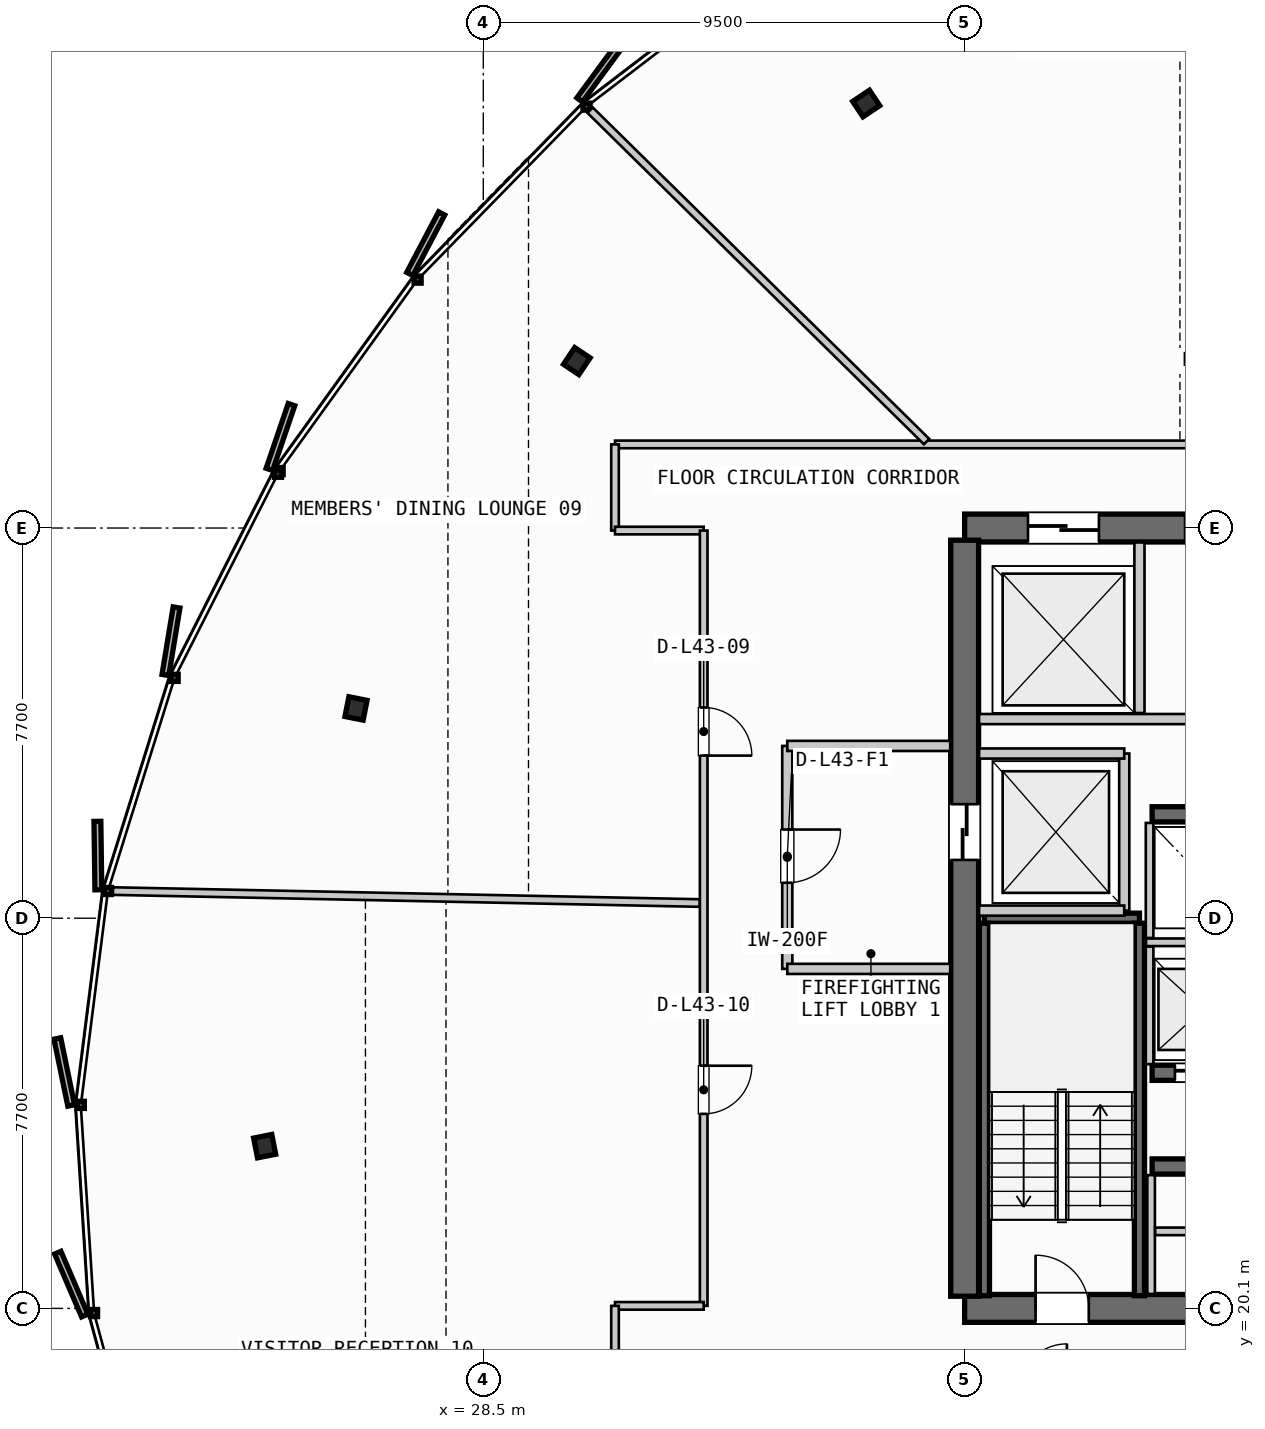
"""IFC4 building model, lengths in metres.
Left out: names, types, materials, properties, quantities, classifications, styles, units other than length and angle.
Written with IfcOpenShell. Run it as: python <this file> out.ifc"""

import sys

from ifc_helpers import new_model, si_unit, direction, frame, frame_2d, origin, origin_2d, place, context, subcontext, project, spatial, rectangle, i_section, extrude, source, transform, mapped, element, fill, save


model = new_model("IFC4")
c1 = context("Model", 3, precision=1e-05, world=origin(), true_north=direction((0.0, 1.0)))
c2 = subcontext(c1, "Body", "Model", "MODEL_VIEW")
j1 = project(units=[si_unit("LENGTHUNIT", "METRE"), si_unit("PLANEANGLEUNIT", "RADIAN")], contexts=[c1])
p1 = place(None, origin())
s1 = spatial("IfcSite", under=j1, at=p1, CompositionType="ELEMENT")
p2 = place(p1, origin())
s2 = spatial("IfcBuilding", under=s1, at=p2, CompositionType="ELEMENT")
p3 = place(p2, frame((0.0, 0.0, 167.85)))
s3 = spatial("IfcBuildingStorey", under=s2, at=p3, CompositionType="ELEMENT", Elevation=167.85)
p4 = place(p3, frame((38.0, 20.1, 0.0), z_axis=(0.0, 0.0, 1.0), x_axis=(1.0, 0.0, 0.0)))
e1 = element("IfcWall", 1, at=p4, inside=s3, PredefinedType="SHEAR", context=c2, shape_type="SweptSolid", body=[
    extrude(rectangle(XDim=17.6, YDim=0.55, at=frame_2d((8.8, 0.0))), origin(), (0.0, 0.0, 1.0), 3.24),
])
p5 = place(p4, frame((1.4, 0.0, 0.0)))
e2 = element("IfcOpeningElement", 2, at=p5, cuts=e1, PredefinedType="OPENING", context=c2, shape_type="SweptSolid", body=[
    extrude(rectangle(XDim=1.05, YDim=2.15, at=frame_2d((0.525, 1.075))), frame((0.0, 0.285, 0.0), z_axis=(0.0, -1.0, 0.0), x_axis=(1.0, 0.0, 0.0)), (0.0, 0.0, 1.0), 0.57),
])
p6 = place(p4, frame((15.15, 0.0, 0.0)))
e3 = element("IfcOpeningElement", 3, at=p6, cuts=e1, PredefinedType="OPENING", context=c2, shape_type="SweptSolid", body=[
    extrude(rectangle(XDim=1.05, YDim=2.15, at=frame_2d((0.525, 1.075))), frame((0.0, 0.285, 0.0), z_axis=(0.0, -1.0, 0.0), x_axis=(1.0, 0.0, 0.0)), (0.0, 0.0, 1.0), 0.57),
])
p7 = place(p4, frame((5.25, 0.0, 0.0)))
e4 = element("IfcOpeningElement", 4, at=p7, cuts=e1, PredefinedType="OPENING", context=c2, shape_type="SweptSolid", body=[
    extrude(rectangle(XDim=0.95, YDim=2.15, at=frame_2d((0.475, 1.075))), frame((0.0, 0.285, 0.0), z_axis=(0.0, -1.0, 0.0), x_axis=(1.0, 0.0, 0.0)), (0.0, 0.0, 1.0), 0.57),
])
p8 = place(p4, frame((11.4, 0.0, 0.0)))
e5 = element("IfcOpeningElement", 5, at=p8, cuts=e1, PredefinedType="OPENING", context=c2, shape_type="SweptSolid", body=[
    extrude(rectangle(XDim=0.95, YDim=2.15, at=frame_2d((0.475, 1.075))), frame((0.0, 0.285, 0.0), z_axis=(0.0, -1.0, 0.0), x_axis=(1.0, 0.0, 0.0)), (0.0, 0.0, 1.0), 0.57),
])
p9 = place(p3, frame((55.6, 35.5, 0.0), z_axis=(0.0, 0.0, 1.0), x_axis=(-1.0, 0.0, 0.0)))
e6 = element("IfcWall", 6, at=p9, inside=s3, PredefinedType="SHEAR", context=c2, shape_type="SweptSolid", body=[
    extrude(rectangle(XDim=17.6, YDim=0.55, at=frame_2d((8.8, 0.0))), origin(), (0.0, 0.0, 1.0), 3.24),
])
p10 = place(p9, frame((8.05, 0.0, 0.0)))
e7 = element("IfcOpeningElement", 7, at=p10, cuts=e6, PredefinedType="OPENING", context=c2, shape_type="SweptSolid", body=[
    extrude(rectangle(XDim=1.5, YDim=2.2, at=frame_2d((0.75, 1.1))), frame((0.0, 0.285, 0.0), z_axis=(0.0, -1.0, 0.0), x_axis=(1.0, 0.0, 0.0)), (0.0, 0.0, 1.0), 0.57),
])
p11 = place(p9, frame((14.95, 0.0, 0.0)))
e8 = element("IfcOpeningElement", 8, at=p11, cuts=e6, PredefinedType="OPENING", context=c2, shape_type="SweptSolid", body=[
    extrude(rectangle(XDim=1.4, YDim=2.3, at=frame_2d((0.7, 1.15))), frame((0.0, 0.285, 0.0), z_axis=(0.0, -1.0, 0.0), x_axis=(1.0, 0.0, 0.0)), (0.0, 0.0, 1.0), 0.57),
])
p12 = place(p9, frame((12.3, 0.0, 0.0)))
e9 = element("IfcOpeningElement", 9, at=p12, cuts=e6, PredefinedType="OPENING", context=c2, shape_type="SweptSolid", body=[
    extrude(rectangle(XDim=0.95, YDim=2.15, at=frame_2d((0.475, 1.075))), frame((0.0, 0.285, 0.0), z_axis=(0.0, -1.0, 0.0), x_axis=(1.0, 0.0, 0.0)), (0.0, 0.0, 1.0), 0.57),
])
p13 = place(p9, frame((10.2, 0.0, 0.0)))
e10 = element("IfcOpeningElement", 10, at=p13, cuts=e6, PredefinedType="OPENING", context=c2, shape_type="SweptSolid", body=[
    extrude(rectangle(XDim=0.9, YDim=2.15, at=frame_2d((0.45, 1.075))), frame((0.0, 0.285, 0.0), z_axis=(0.0, -1.0, 0.0), x_axis=(1.0, 0.0, 0.0)), (0.0, 0.0, 1.0), 0.57),
])
p14 = place(p3, frame((38.0, 35.26, 0.0), z_axis=(0.0, 0.0, 1.0), x_axis=(0.0, -1.0, 0.0)))
e11 = element("IfcWall", 11, at=p14, inside=s3, PredefinedType="SHEAR", context=c2, shape_type="SweptSolid", body=[
    extrude(rectangle(XDim=14.92, YDim=0.55, at=frame_2d((7.46, 0.0))), origin(), (0.0, 0.0, 1.0), 3.24),
])
p15 = place(p14, frame((5.21, 0.0, 0.0)))
e12 = element("IfcOpeningElement", 12, at=p15, cuts=e11, PredefinedType="OPENING", context=c2, shape_type="SweptSolid", body=[
    extrude(rectangle(XDim=1.1, YDim=2.2, at=frame_2d((0.55, 1.1))), frame((0.0, 0.285, 0.0), z_axis=(0.0, -1.0, 0.0), x_axis=(1.0, 0.0, 0.0)), (0.0, 0.0, 1.0), 0.57),
])
p16 = place(p3, frame((41.7, 22.9, 0.0), z_axis=(0.0, 0.0, 1.0), x_axis=(1.0, 0.0, 0.0)))
e13 = element("IfcWall", 13, at=p16, inside=s3, PredefinedType="SHEAR", context=c2, shape_type="SweptSolid", body=[
    extrude(rectangle(XDim=4.25, YDim=0.3, at=frame_2d((2.125, 0.0))), origin(), (0.0, 0.0, 1.0), 3.24),
])
p17 = place(p3, frame((41.7, 24.75, 0.0), z_axis=(0.0, 0.0, 1.0), x_axis=(1.0, 0.0, 0.0)))
e14 = element("IfcWall", 14, at=p17, inside=s3, PredefinedType="SHEAR", context=c2, shape_type="SweptSolid", body=[
    extrude(rectangle(XDim=4.25, YDim=0.3, at=frame_2d((2.125, 0.0))), origin(), (0.0, 0.0, 1.0), 3.24),
])
p18 = place(p17, frame((0.45, 0.0, 0.0)))
e15 = element("IfcOpeningElement", 15, at=p18, cuts=e14, PredefinedType="OPENING", context=c2, shape_type="SweptSolid", body=[
    extrude(rectangle(XDim=1.1, YDim=2.2, at=frame_2d((0.55, 1.1))), frame((0.0, 0.16, 0.0), z_axis=(0.0, -1.0, 0.0), x_axis=(1.0, 0.0, 0.0)), (0.0, 0.0, 1.0), 0.32),
])
p19 = place(p17, frame((2.5, 0.0, 0.0)))
e16 = element("IfcOpeningElement", 16, at=p19, cuts=e14, PredefinedType="OPENING", context=c2, shape_type="SweptSolid", body=[
    extrude(rectangle(XDim=1.1, YDim=2.2, at=frame_2d((0.55, 1.1))), frame((0.0, 0.16, 0.0), z_axis=(0.0, -1.0, 0.0), x_axis=(1.0, 0.0, 0.0)), (0.0, 0.0, 1.0), 0.32),
])
p20 = place(p3, frame((41.7, 29.85, 0.0), z_axis=(0.0, 0.0, 1.0), x_axis=(1.0, 0.0, 0.0)))
e17 = element("IfcWall", 17, at=p20, inside=s3, PredefinedType="SHEAR", context=c2, shape_type="SweptSolid", body=[
    extrude(rectangle(XDim=4.25, YDim=0.3, at=frame_2d((2.125, 0.0))), origin(), (0.0, 0.0, 1.0), 3.24),
])
m1 = source(origin(), c2, "Body", "SweptSolid", [
    extrude(i_section(OverallWidth=0.397, OverallDepth=0.365, WebThickness=0.028, FlangeThickness=0.044, FilletRadius=0.015, at=origin_2d()), origin(), (0.0, 0.0, 1.0), 3.24),
])
for number, where, z_axis, x_axis in (
    (18, (36.058, 43.877, 0.0), (0.0, 0.0, 1.0), (-0.556, 0.831, 0.0)),
    (19, (30.346, 38.794, 0.0), (0.0, 0.0, 1.0), (-0.831, 0.556, 0.0)),
    (20, (25.989, 31.94, 0.0), (0.0, 0.0, 1.0), (-0.981, 0.195, 0.0)),
    (21, (24.185, 23.302, 0.0), (0.0, 0.0, 1.0), (-0.981, -0.195, 0.0)),
):
    element("IfcColumn", number, at=place(p3, frame(where, z_axis=z_axis, x_axis=x_axis)), inside=s3, PredefinedType="COLUMN", context=c2, shape_type="MappedRepresentation", body=[
        mapped(m1, transform((0.0, 0.0, 0.0), scale=1.0)),
    ])
p21 = place(p3, frame((38.39, 27.8, 0.0), z_axis=(0.0, 0.0, 1.0), x_axis=(1.0, 0.0, 0.0)))
e22 = element("IfcWall", 22, at=p21, inside=s3, PredefinedType="SHEAR", context=c2, shape_type="SweptSolid", body=[
    extrude(rectangle(XDim=3.06, YDim=0.2, at=frame_2d((1.53, 0.0))), origin(), (0.0, 0.0, 1.0), 3.24),
])
for number, where, z_axis, x_axis in (
    (23, (41.45, 27.7, 0.0), (0.0, 0.0, 1.0), (0.0, -1.0, 0.0)),
    (24, (38.39, 20.35, 0.0), (0.0, 0.0, 1.0), (0.0, 1.0, 0.0)),
):
    element("IfcWall", number, at=place(p3, frame(where, z_axis=z_axis, x_axis=x_axis)), inside=s3, PredefinedType="SHEAR", context=c2, shape_type="SweptSolid", body=[
        extrude(rectangle(XDim=7.35, YDim=0.2, at=frame_2d((3.675, 0.0))), origin(), (0.0, 0.0, 1.0), 3.24),
    ])
p22 = place(p3, frame((41.15, 27.95, 0.0), z_axis=(0.0, 0.0, 1.0), x_axis=(0.0, 1.0, 0.0)))
e25 = element("IfcWall", 25, at=p22, inside=s3, PredefinedType="PARTITIONING", context=c2, shape_type="SweptSolid", body=[
    extrude(rectangle(XDim=3.1, YDim=0.2, at=frame_2d((1.55, 0.0))), origin(), (0.0, 0.0, 1.0), 2.28),
])
for number, where, z_axis, x_axis in (
    (26, (38.285, 27.95, 0.0), (0.0, 0.0, 1.0), (1.0, 0.0, 0.0)),
    (27, (38.285, 31.05, 0.0), (0.0, 0.0, 1.0), (1.0, 0.0, 0.0)),
):
    element("IfcWall", number, at=place(p3, frame(where, z_axis=z_axis, x_axis=x_axis)), inside=s3, PredefinedType="PARTITIONING", context=c2, shape_type="SweptSolid", body=[
        extrude(rectangle(XDim=2.865, YDim=0.2, at=frame_2d((1.433, 0.0))), origin(), (0.0, 0.0, 1.0), 2.28),
    ])
p23 = place(p3, frame((34.5, 31.2, 0.0), z_axis=(0.0, 0.0, 1.0), x_axis=(0.0, -1.0, 0.0)))
e28 = element("IfcWall", 28, at=p23, inside=s3, PredefinedType="PARTITIONING", context=c2, shape_type="SweptSolid", body=[
    extrude(rectangle(XDim=4.4, YDim=0.2, at=frame_2d((2.2, 0.0))), origin(), (0.0, 0.0, 1.0), 2.28),
])
p24 = place(p23, frame((1.65, 0.0, 0.0)))
e29 = element("IfcOpeningElement", 29, at=p24, cuts=e28, PredefinedType="OPENING", context=c2, shape_type="SweptSolid", body=[
    extrude(rectangle(XDim=1.05, YDim=2.15, at=frame_2d((0.525, 1.075))), frame((0.0, 0.11, 0.0), z_axis=(0.0, -1.0, 0.0), x_axis=(1.0, 0.0, 0.0)), (0.0, 0.0, 1.0), 0.22),
])
for number, where, z_axis, x_axis in (
    (30, (34.5, 26.8, 0.0), (0.0, 0.0, 1.0), (1.0, 0.0, 0.0)),
    (31, (34.5, 31.2, 0.0), (0.0, 0.0, 1.0), (1.0, 0.0, 0.0)),
):
    element("IfcWall", number, at=place(p3, frame(where, z_axis=z_axis, x_axis=x_axis)), inside=s3, PredefinedType="PARTITIONING", context=c2, shape_type="SweptSolid", body=[
        extrude(rectangle(XDim=3.215, YDim=0.2, at=frame_2d((1.607, 0.0))), origin(), (0.0, 0.0, 1.0), 2.28),
    ])
p25 = place(p3, frame((41.68, 20.385, 0.0), z_axis=(0.0, 0.0, 1.0), x_axis=(0.0, 1.0, 0.0)))
e32 = element("IfcWall", 32, at=p25, inside=s3, PredefinedType="PARTITIONING", context=c2, shape_type="SweptSolid", body=[
    extrude(rectangle(XDim=2.345, YDim=0.15, at=frame_2d((1.172, 0.0))), origin(), (0.0, 0.0, 1.0), 2.28),
])
p26 = place(p3, frame((41.76, 21.62, 0.0), z_axis=(0.0, 0.0, 1.0), x_axis=(1.0, 0.0, 0.0)))
e33 = element("IfcWall", 33, at=p26, inside=s3, PredefinedType="PARTITIONING", context=c2, shape_type="SweptSolid", body=[
    extrude(rectangle(XDim=3.96, YDim=0.15, at=frame_2d((1.98, 0.0))), origin(), (0.0, 0.0, 1.0), 2.28),
])
p27 = place(p26, frame((1.55, 0.0, 0.0)))
e34 = element("IfcOpeningElement", 34, at=p27, cuts=e33, PredefinedType="OPENING", context=c2, shape_type="SweptSolid", body=[
    extrude(rectangle(XDim=0.85, YDim=2.15, at=frame_2d((0.425, 1.075))), frame((0.0, 0.085, 0.0), z_axis=(0.0, -1.0, 0.0), x_axis=(1.0, 0.0, 0.0)), (0.0, 0.0, 1.0), 0.17),
])
p28 = place(p3, frame((41.58, 27.325, 0.0), z_axis=(0.0, 0.0, 1.0), x_axis=(1.0, 0.0, 0.0)))
e35 = element("IfcWall", 35, at=p28, inside=s3, PredefinedType="PARTITIONING", context=c2, shape_type="SweptSolid", body=[
    extrude(rectangle(XDim=4.32, YDim=0.15, at=frame_2d((2.16, 0.0))), origin(), (0.0, 0.0, 1.0), 2.28),
])
p29 = place(p3, frame((41.65, 24.92, 0.0), z_axis=(0.0, 0.0, 1.0), x_axis=(0.0, 1.0, 0.0)))
e36 = element("IfcWall", 36, at=p29, inside=s3, PredefinedType="PARTITIONING", context=c2, shape_type="SweptSolid", body=[
    extrude(rectangle(XDim=2.32, YDim=0.15, at=frame_2d((1.16, 0.0))), origin(), (0.0, 0.0, 1.0), 2.28),
])
p30 = place(p3, frame((41.65, 27.41, 0.0), z_axis=(0.0, 0.0, 1.0), x_axis=(0.0, 1.0, 0.0)))
e37 = element("IfcWall", 37, at=p30, inside=s3, PredefinedType="PARTITIONING", context=c2, shape_type="SweptSolid", body=[
    extrude(rectangle(XDim=2.27, YDim=0.15, at=frame_2d((1.135, 0.0))), origin(), (0.0, 0.0, 1.0), 2.28),
])
p31 = place(p3, frame((41.45, 31.85, 0.0), z_axis=(0.0, 0.0, 1.0), x_axis=(0.0, 1.0, 0.0)))
e38 = element("IfcWall", 38, at=p31, inside=s3, PredefinedType="PARTITIONING", context=c2, shape_type="SweptSolid", body=[
    extrude(rectangle(XDim=3.365, YDim=0.2, at=frame_2d((1.683, 0.0))), origin(), (0.0, 0.0, 1.0), 2.28),
])
p32 = place(p3, frame((38.285, 31.73, 0.0), z_axis=(0.0, 0.0, 1.0), x_axis=(1.0, 0.0, 0.0)))
e39 = element("IfcWall", 39, at=p32, inside=s3, PredefinedType="PARTITIONING", context=c2, shape_type="SweptSolid", body=[
    extrude(rectangle(XDim=7.515, YDim=0.2, at=frame_2d((3.758, 0.0))), origin(), (0.0, 0.0, 1.0), 2.28),
])
p33 = place(p3, frame((62.5, 37.15, 0.0), z_axis=(0.0, 0.0, 1.0), x_axis=(-1.0, 0.0, 0.0)))
e40 = element("IfcWall", 40, at=p33, inside=s3, PredefinedType="PARTITIONING", context=c2, shape_type="SweptSolid", body=[
    extrude(rectangle(XDim=31.4, YDim=0.15, at=frame_2d((15.7, 0.0))), origin(), (0.0, 0.0, 1.0), 2.28),
])
p34 = place(p33, frame((6.446, 0.0, 0.0)))
e41 = element("IfcOpeningElement", 41, at=p34, cuts=e40, PredefinedType="OPENING", context=c2, shape_type="SweptSolid", body=[
    extrude(rectangle(XDim=0.95, YDim=2.15, at=frame_2d((0.475, 1.075))), frame((0.0, 0.085, 0.0), z_axis=(0.0, -1.0, 0.0), x_axis=(1.0, 0.0, 0.0)), (0.0, 0.0, 1.0), 0.17),
])
p35 = place(p33, frame((18.808, 0.0, 0.0)))
e42 = element("IfcOpeningElement", 42, at=p35, cuts=e40, PredefinedType="OPENING", context=c2, shape_type="SweptSolid", body=[
    extrude(rectangle(XDim=0.95, YDim=2.15, at=frame_2d((0.475, 1.075))), frame((0.0, 0.085, 0.0), z_axis=(0.0, -1.0, 0.0), x_axis=(1.0, 0.0, 0.0)), (0.0, 0.0, 1.0), 0.17),
])
p36 = place(p3, frame((31.1, 37.15, 0.0), z_axis=(0.0, 0.0, 1.0), x_axis=(0.0, -1.0, 0.0)))
e43 = element("IfcWall", 43, at=p36, inside=s3, PredefinedType="PARTITIONING", context=c2, shape_type="SweptSolid", body=[
    extrude(rectangle(XDim=1.7, YDim=0.15, at=frame_2d((0.85, 0.0))), origin(), (0.0, 0.0, 1.0), 2.28),
])
p37 = place(p3, frame((31.1, 35.45, 0.0), z_axis=(0.0, 0.0, 1.0), x_axis=(1.0, 0.0, 0.0)))
e44 = element("IfcWall", 44, at=p37, inside=s3, PredefinedType="PARTITIONING", context=c2, shape_type="SweptSolid", body=[
    extrude(rectangle(XDim=1.75, YDim=0.15, at=frame_2d((0.875, 0.0))), origin(), (0.0, 0.0, 1.0), 2.28),
])
p38 = place(p3, frame((32.85, 35.45, 0.0), z_axis=(0.0, 0.0, 1.0), x_axis=(0.0, -1.0, 0.0)))
e45 = element("IfcWall", 45, at=p38, inside=s3, PredefinedType="PARTITIONING", context=c2, shape_type="SweptSolid", body=[
    extrude(rectangle(XDim=15.3, YDim=0.15, at=frame_2d((7.65, 0.0))), origin(), (0.0, 0.0, 1.0), 2.28),
])
p39 = place(p38, frame((3.491, 0.0, 0.0)))
e46 = element("IfcOpeningElement", 46, at=p39, cuts=e45, PredefinedType="OPENING", context=c2, shape_type="SweptSolid", body=[
    extrude(rectangle(XDim=0.95, YDim=2.15, at=frame_2d((0.475, 1.075))), frame((0.0, 0.085, 0.0), z_axis=(0.0, -1.0, 0.0), x_axis=(1.0, 0.0, 0.0)), (0.0, 0.0, 1.0), 0.17),
])
p40 = place(p38, frame((10.561, 0.0, 0.0)))
e47 = element("IfcOpeningElement", 47, at=p40, cuts=e45, PredefinedType="OPENING", context=c2, shape_type="SweptSolid", body=[
    extrude(rectangle(XDim=0.95, YDim=2.15, at=frame_2d((0.475, 1.075))), frame((0.0, 0.085, 0.0), z_axis=(0.0, -1.0, 0.0), x_axis=(1.0, 0.0, 0.0)), (0.0, 0.0, 1.0), 0.17),
])
p41 = place(p3, frame((32.85, 20.15, 0.0), z_axis=(0.0, 0.0, 1.0), x_axis=(-1.0, 0.0, 0.0)))
e48 = element("IfcWall", 48, at=p41, inside=s3, PredefinedType="PARTITIONING", context=c2, shape_type="SweptSolid", body=[
    extrude(rectangle(XDim=1.75, YDim=0.15, at=frame_2d((0.875, 0.0))), origin(), (0.0, 0.0, 1.0), 2.28),
])
p42 = place(p3, frame((31.1, 20.15, 0.0), z_axis=(0.0, 0.0, 1.0), x_axis=(0.0, -1.0, 0.0)))
e49 = element("IfcWall", 49, at=p42, inside=s3, PredefinedType="PARTITIONING", context=c2, shape_type="SweptSolid", body=[
    extrude(rectangle(XDim=1.7, YDim=0.15, at=frame_2d((0.85, 0.0))), origin(), (0.0, 0.0, 1.0), 2.28),
])
p43 = place(p3, frame((37.249, 37.206, 0.0), z_axis=(0.0, 0.0, 1.0), x_axis=(-0.712469695258, 0.701702881096, 0.0)))
e50 = element("IfcWall", 50, at=p43, inside=s3, PredefinedType="PARTITIONING", context=c2, shape_type="SweptSolid", body=[
    extrude(rectangle(XDim=9.32, YDim=0.15, at=frame_2d((4.66, 0.0))), origin(), (0.0, 0.0, 1.0), 2.28),
])
p44 = place(p3, frame((32.77, 28.1, 0.0), z_axis=(0.0, 0.0, 1.0), x_axis=(-0.999792607631, 0.020365208733, 0.0)))
e51 = element("IfcWall", 51, at=p44, inside=s3, PredefinedType="PARTITIONING", context=c2, shape_type="SweptSolid", body=[
    extrude(rectangle(XDim=11.581, YDim=0.15, at=frame_2d((5.79, 0.0))), origin(), (0.0, 0.0, 1.0), 2.28),
])
m2 = source(origin(), c2, "Body", "SweptSolid", [
    extrude(rectangle(XDim=1.05, YDim=2.15, at=frame_2d((0.525, 1.075))), frame((0.0, 0.025, 0.0), z_axis=(0.0, -1.0, 0.0), x_axis=(1.0, 0.0, 0.0)), (0.0, 0.0, 1.0), 0.05),
])
p45 = place(p5, origin())
e52 = element("IfcDoor", 52, at=p45, inside=s3, OperationType="SINGLE_SWING_LEFT", PredefinedType="DOOR", context=c2, shape_type="MappedRepresentation", body=[
    mapped(m2, transform((0.0, 0.0, 0.0), scale=1.0)),
])
fill(e2, e52)
m3 = source(origin(), c2, "Body", "SweptSolid", [
    extrude(rectangle(XDim=1.1, YDim=2.2, at=frame_2d((0.55, 1.1))), frame((0.0, 0.025, 0.0), z_axis=(0.0, -1.0, 0.0), x_axis=(1.0, 0.0, 0.0)), (0.0, 0.0, 1.0), 0.05),
])
p46 = place(p15, origin())
e53 = element("IfcDoor", 53, at=p46, inside=s3, OperationType="SLIDING_TO_LEFT", PredefinedType="DOOR", context=c2, shape_type="MappedRepresentation", body=[
    mapped(m3, transform((0.0, 0.0, 0.0), scale=1.0)),
])
fill(e12, e53)
p47 = place(p18, origin())
e54 = element("IfcDoor", 54, at=p47, inside=s3, OperationType="SLIDING_TO_RIGHT", PredefinedType="DOOR", context=c2, shape_type="MappedRepresentation", body=[
    mapped(m3, transform((0.0, 0.0, 0.0), scale=1.0)),
])
fill(e15, e54)
m4 = source(origin(), c2, "Body", "SweptSolid", [
    extrude(rectangle(XDim=1.4, YDim=2.3, at=frame_2d((0.7, 1.15))), frame((0.0, 0.025, 0.0), z_axis=(0.0, -1.0, 0.0), x_axis=(1.0, 0.0, 0.0)), (0.0, 0.0, 1.0), 0.05),
])
p48 = place(p11, origin())
e55 = element("IfcDoor", 55, at=p48, inside=s3, OperationType="SLIDING_TO_RIGHT", PredefinedType="DOOR", context=c2, shape_type="MappedRepresentation", body=[
    mapped(m4, transform((0.0, 0.0, 0.0), scale=1.0)),
])
fill(e8, e55)
m5 = source(origin(), c2, "Body", "SweptSolid", [
    extrude(rectangle(XDim=0.95, YDim=2.15, at=frame_2d((0.475, 1.075))), frame((0.0, 0.025, 0.0), z_axis=(0.0, -1.0, 0.0), x_axis=(1.0, 0.0, 0.0)), (0.0, 0.0, 1.0), 0.05),
])
p49 = place(p12, origin())
e56 = element("IfcDoor", 56, at=p49, inside=s3, OperationType="SINGLE_SWING_LEFT", PredefinedType="DOOR", context=c2, shape_type="MappedRepresentation", body=[
    mapped(m5, transform((0.0, 0.0, 0.0), scale=1.0)),
])
fill(e9, e56)
p50 = place(p24, origin())
e57 = element("IfcDoor", 57, at=p50, inside=s3, OperationType="SINGLE_SWING_LEFT", PredefinedType="DOOR", context=c2, shape_type="MappedRepresentation", body=[
    mapped(m2, transform((0.0, 0.0, 0.0), scale=1.0)),
])
fill(e29, e57)
p51 = place(p39, origin())
e58 = element("IfcDoor", 58, at=p51, inside=s3, OperationType="SINGLE_SWING_RIGHT", PredefinedType="DOOR", context=c2, shape_type="MappedRepresentation", body=[
    mapped(m5, transform((0.0, 0.0, 0.0), scale=1.0)),
])
fill(e46, e58)
p52 = place(p40, origin())
e59 = element("IfcDoor", 59, at=p52, inside=s3, OperationType="SINGLE_SWING_LEFT", PredefinedType="DOOR", context=c2, shape_type="MappedRepresentation", body=[
    mapped(m5, transform((0.0, 0.0, 0.0), scale=1.0)),
])
fill(e47, e59)
save(model, sys.argv[1])
